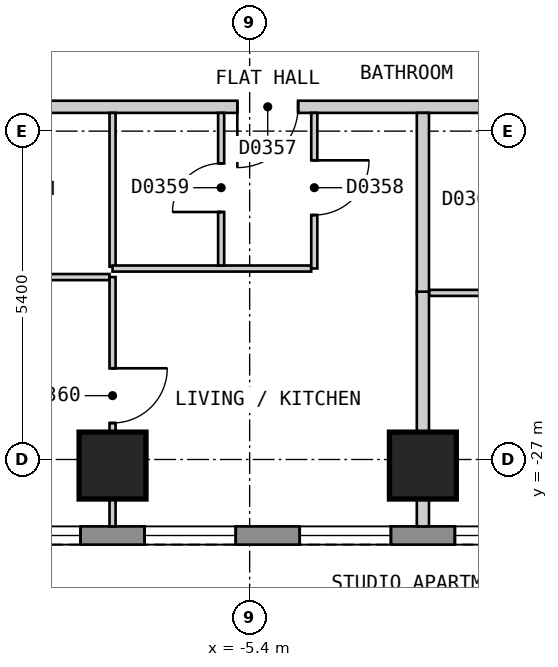
"""IFC4 building model, lengths in metres.
Left out: names, types, materials, properties, quantities, classifications, styles, units other than length and angle.
Written with IfcOpenShell. Run it as: python <this file> out.ifc"""

import sys

from ifc_helpers import new_model, si_unit, direction, frame, frame_2d, origin, origin_2d, place, context, subcontext, project, spatial, polyline, rectangle, outline, extrude, element, fill, save


model = new_model("IFC4")
c1 = context("Model", 3, precision=1e-05, world=origin(), true_north=direction((0.0, 1.0)))
c2 = subcontext(c1, "Body", "Model", "MODEL_VIEW")
j1 = project(units=[si_unit("LENGTHUNIT", "METRE"), si_unit("PLANEANGLEUNIT", "RADIAN")], contexts=[c1])
p1 = place(None, origin())
s1 = spatial("IfcSite", under=j1, at=p1, CompositionType="ELEMENT")
p2 = place(p1, origin())
s2 = spatial("IfcBuilding", under=s1, at=p2, CompositionType="ELEMENT")
p3 = place(p2, frame((0.0, 0.0, 59.4)))
s3 = spatial("IfcBuildingStorey", under=s2, at=p3, CompositionType="ELEMENT", Elevation=59.4)
for number, where, z_axis, x_axis in (
    (1, (-7.655, -27.1, 0.0), (0.0, 0.0, 1.0), (1.0, 0.0, 0.0)),
    (2, (-2.551, -27.1, 0.0), (0.0, 0.0, 1.0), (1.0, 0.0, 0.0)),
):
    element("IfcColumn", number, at=place(p3, frame(where, z_axis=z_axis, x_axis=x_axis)), inside=s3, PredefinedType="COLUMN", context=c2, shape_type="SweptSolid", body=[
        extrude(rectangle(XDim=1.1, YDim=1.1, at=origin_2d()), origin(), (0.0, 0.0, 1.0), 3.0),
    ])
p4 = place(p3, frame((-13.51, -28.25, 0.0), z_axis=(0.0, 0.0, 1.0), x_axis=(1.0, 0.0, 0.0)))
e3 = element("IfcWall", 3, at=p4, inside=s3, PredefinedType="SOLIDWALL", context=c2, shape_type="SweptSolid", body=[
    extrude(outline(polyline([(0.0, -0.15), (27.02, -0.15), (26.94, 0.15), (0.08, 0.15), (0.0, -0.15)])), origin(), (0.0, 0.0, 1.0), 2.6),
])
p5 = place(p4, frame((1.277, 0.0, 0.15)))
e4 = element("IfcOpeningElement", 4, at=p5, cuts=e3, PredefinedType="OPENING", context=c2, shape_type="SweptSolid", body=[
    extrude(rectangle(XDim=1.5, YDim=2.1, at=frame_2d((0.75, 1.05))), frame((0.0, 0.16, 0.0), z_axis=(0.0, -1.0, 0.0), x_axis=(1.0, 0.0, 0.0)), (0.0, 0.0, 1.0), 0.32),
])
p6 = place(p4, frame((3.829, 0.0, 0.15)))
e5 = element("IfcOpeningElement", 5, at=p6, cuts=e3, PredefinedType="OPENING", context=c2, shape_type="SweptSolid", body=[
    extrude(rectangle(XDim=1.5, YDim=2.1, at=frame_2d((0.75, 1.05))), frame((0.0, 0.16, 0.0), z_axis=(0.0, -1.0, 0.0), x_axis=(1.0, 0.0, 0.0)), (0.0, 0.0, 1.0), 0.32),
])
p7 = place(p4, frame((6.381, 0.0, 0.15)))
e6 = element("IfcOpeningElement", 6, at=p7, cuts=e3, PredefinedType="OPENING", context=c2, shape_type="SweptSolid", body=[
    extrude(rectangle(XDim=1.5, YDim=2.1, at=frame_2d((0.75, 1.05))), frame((0.0, 0.16, 0.0), z_axis=(0.0, -1.0, 0.0), x_axis=(1.0, 0.0, 0.0)), (0.0, 0.0, 1.0), 0.32),
])
p8 = place(p4, frame((8.933, 0.0, 0.15)))
e7 = element("IfcOpeningElement", 7, at=p8, cuts=e3, PredefinedType="OPENING", context=c2, shape_type="SweptSolid", body=[
    extrude(rectangle(XDim=1.5, YDim=2.1, at=frame_2d((0.75, 1.05))), frame((0.0, 0.16, 0.0), z_axis=(0.0, -1.0, 0.0), x_axis=(1.0, 0.0, 0.0)), (0.0, 0.0, 1.0), 0.32),
])
p9 = place(p4, frame((11.485, 0.0, 0.15)))
e8 = element("IfcOpeningElement", 8, at=p9, cuts=e3, PredefinedType="OPENING", context=c2, shape_type="SweptSolid", body=[
    extrude(rectangle(XDim=1.5, YDim=2.1, at=frame_2d((0.75, 1.05))), frame((0.0, 0.16, 0.0), z_axis=(0.0, -1.0, 0.0), x_axis=(1.0, 0.0, 0.0)), (0.0, 0.0, 1.0), 0.32),
])
p10 = place(p4, frame((14.037, 0.0, 0.15)))
e9 = element("IfcOpeningElement", 9, at=p10, cuts=e3, PredefinedType="OPENING", context=c2, shape_type="SweptSolid", body=[
    extrude(rectangle(XDim=1.5, YDim=2.1, at=frame_2d((0.75, 1.05))), frame((0.0, 0.16, 0.0), z_axis=(0.0, -1.0, 0.0), x_axis=(1.0, 0.0, 0.0)), (0.0, 0.0, 1.0), 0.32),
])
p11 = place(p4, frame((16.589, 0.0, 0.15)))
e10 = element("IfcOpeningElement", 10, at=p11, cuts=e3, PredefinedType="OPENING", context=c2, shape_type="SweptSolid", body=[
    extrude(rectangle(XDim=1.5, YDim=2.1, at=frame_2d((0.75, 1.05))), frame((0.0, 0.16, 0.0), z_axis=(0.0, -1.0, 0.0), x_axis=(1.0, 0.0, 0.0)), (0.0, 0.0, 1.0), 0.32),
])
p12 = place(p4, frame((19.141, 0.0, 0.15)))
e11 = element("IfcOpeningElement", 11, at=p12, cuts=e3, PredefinedType="OPENING", context=c2, shape_type="SweptSolid", body=[
    extrude(rectangle(XDim=1.5, YDim=2.1, at=frame_2d((0.75, 1.05))), frame((0.0, 0.16, 0.0), z_axis=(0.0, -1.0, 0.0), x_axis=(1.0, 0.0, 0.0)), (0.0, 0.0, 1.0), 0.32),
])
p13 = place(p4, frame((21.693, 0.0, 0.15)))
e12 = element("IfcOpeningElement", 12, at=p13, cuts=e3, PredefinedType="OPENING", context=c2, shape_type="SweptSolid", body=[
    extrude(rectangle(XDim=1.5, YDim=2.1, at=frame_2d((0.75, 1.05))), frame((0.0, 0.16, 0.0), z_axis=(0.0, -1.0, 0.0), x_axis=(1.0, 0.0, 0.0)), (0.0, 0.0, 1.0), 0.32),
])
p14 = place(p4, frame((24.245, 0.0, 0.15)))
e13 = element("IfcOpeningElement", 13, at=p14, cuts=e3, PredefinedType="OPENING", context=c2, shape_type="SweptSolid", body=[
    extrude(rectangle(XDim=1.5, YDim=2.1, at=frame_2d((0.75, 1.05))), frame((0.0, 0.16, 0.0), z_axis=(0.0, -1.0, 0.0), x_axis=(1.0, 0.0, 0.0)), (0.0, 0.0, 1.0), 0.32),
])
p15 = place(p3, frame((-15.4, -21.2, 0.0), z_axis=(0.0, 0.0, 1.0), x_axis=(1.0, 0.0, 0.0)))
e14 = element("IfcWall", 14, at=p15, inside=s3, PredefinedType="PARTITIONING", context=c2, shape_type="SweptSolid", body=[
    extrude(rectangle(XDim=30.799, YDim=0.2, at=frame_2d((15.399, 0.0))), origin(), (0.0, 0.0, 1.0), 2.6),
])
p16 = place(p15, frame((9.797, 0.0, 0.0)))
e15 = element("IfcOpeningElement", 15, at=p16, cuts=e14, PredefinedType="OPENING", context=c2, shape_type="SweptSolid", body=[
    extrude(rectangle(XDim=1.0, YDim=2.1, at=frame_2d((0.5, 1.05))), frame((0.0, 0.11, 0.0), z_axis=(0.0, -1.0, 0.0), x_axis=(1.0, 0.0, 0.0)), (0.0, 0.0, 1.0), 0.22),
])
p17 = place(p15, frame((14.901, 0.0, 0.0)))
e16 = element("IfcOpeningElement", 16, at=p17, cuts=e14, PredefinedType="OPENING", context=c2, shape_type="SweptSolid", body=[
    extrude(rectangle(XDim=1.0, YDim=2.1, at=frame_2d((0.5, 1.05))), frame((0.0, 0.11, 0.0), z_axis=(0.0, -1.0, 0.0), x_axis=(1.0, 0.0, 0.0)), (0.0, 0.0, 1.0), 0.22),
])
p18 = place(p15, frame((24.916, 0.0, 0.0)))
e17 = element("IfcOpeningElement", 17, at=p18, cuts=e14, PredefinedType="OPENING", context=c2, shape_type="SweptSolid", body=[
    extrude(rectangle(XDim=0.9, YDim=2.1, at=frame_2d((0.45, 1.05))), frame((0.0, 0.11, 0.0), z_axis=(0.0, -1.0, 0.0), x_axis=(1.0, 0.0, 0.0)), (0.0, 0.0, 1.0), 0.22),
])
p19 = place(p3, frame((-7.655, -21.3, 0.0), z_axis=(0.0, 0.0, 1.0), x_axis=(0.0, -1.0, 0.0)))
e18 = element("IfcWall", 18, at=p19, inside=s3, PredefinedType="PARTITIONING", context=c2, shape_type="SweptSolid", body=[
    extrude(rectangle(XDim=2.53, YDim=0.1, at=frame_2d((1.265, 0.0))), origin(), (0.0, 0.0, 1.0), 2.6),
])
p20 = place(p3, frame((-7.655, -23.86, 0.0), z_axis=(0.0, 0.0, 1.0), x_axis=(1.0, 0.0, 0.0)))
e19 = element("IfcWall", 19, at=p20, inside=s3, PredefinedType="PARTITIONING", context=c2, shape_type="SweptSolid", body=[
    extrude(rectangle(XDim=3.267, YDim=0.1, at=frame_2d((1.634, 0.0))), origin(), (0.0, 0.0, 1.0), 2.6),
])
p21 = place(p3, frame((-15.848, -24.0, 0.0), z_axis=(0.0, 0.0, 1.0), x_axis=(1.0, 0.0, 0.0)))
e20 = element("IfcWall", 20, at=p21, inside=s3, PredefinedType="PARTITIONING", context=c2, shape_type="SweptSolid", body=[
    extrude(rectangle(XDim=8.143, YDim=0.1, at=frame_2d((4.071, 0.0))), origin(), (0.0, 0.0, 1.0), 2.6),
])
p22 = place(p21, frame((3.596, 0.0, 0.0)))
e21 = element("IfcOpeningElement", 21, at=p22, cuts=e20, PredefinedType="OPENING", context=c2, shape_type="SweptSolid", body=[
    extrude(rectangle(XDim=0.8, YDim=2.1, at=frame_2d((0.4, 1.05))), frame((0.0, 0.06, 0.0), z_axis=(0.0, -1.0, 0.0), x_axis=(1.0, 0.0, 0.0)), (0.0, 0.0, 1.0), 0.12),
])
p23 = place(p3, frame((-2.451, -24.26, 0.0), z_axis=(0.0, 0.0, 1.0), x_axis=(1.0, 0.0, 0.0)))
e22 = element("IfcWall", 22, at=p23, inside=s3, PredefinedType="PARTITIONING", context=c2, shape_type="SweptSolid", body=[
    extrude(rectangle(XDim=3.167, YDim=0.1, at=frame_2d((1.583, 0.0))), origin(), (0.0, 0.0, 1.0), 2.6),
])
p24 = place(p3, frame((-4.337, -23.859, 0.0), z_axis=(0.0, 0.0, 1.0), x_axis=(0.0, 1.0, 0.0)))
e23 = element("IfcWall", 23, at=p24, inside=s3, PredefinedType="PARTITIONING", context=c2, shape_type="SweptSolid", body=[
    extrude(rectangle(XDim=2.559, YDim=0.1, at=frame_2d((1.279, 0.0))), origin(), (0.0, 0.0, 1.0), 2.6),
])
p25 = place(p24, frame((0.879, 0.0, 0.0)))
e24 = element("IfcOpeningElement", 24, at=p25, cuts=e23, PredefinedType="OPENING", context=c2, shape_type="SweptSolid", body=[
    extrude(rectangle(XDim=0.9, YDim=2.1, at=frame_2d((0.45, 1.05))), frame((0.0, 0.06, 0.0), z_axis=(0.0, -1.0, 0.0), x_axis=(1.0, 0.0, 0.0)), (0.0, 0.0, 1.0), 0.12),
])
p26 = place(p3, frame((-5.869, -23.81, 0.0), z_axis=(0.0, 0.0, 1.0), x_axis=(0.0, 1.0, 0.0)))
e25 = element("IfcWall", 25, at=p26, inside=s3, PredefinedType="PARTITIONING", context=c2, shape_type="SweptSolid", body=[
    extrude(rectangle(XDim=2.51, YDim=0.1, at=frame_2d((1.255, 0.0))), origin(), (0.0, 0.0, 1.0), 2.6),
])
p27 = place(p26, frame((0.88, 0.0, 0.0)))
e26 = element("IfcOpeningElement", 26, at=p27, cuts=e25, PredefinedType="OPENING", context=c2, shape_type="SweptSolid", body=[
    extrude(rectangle(XDim=0.8, YDim=2.1, at=frame_2d((0.4, 1.05))), frame((0.0, 0.06, 0.0), z_axis=(0.0, -1.0, 0.0), x_axis=(1.0, 0.0, 0.0)), (0.0, 0.0, 1.0), 0.12),
])
p28 = place(p3, frame((-7.655, -28.1, 0.0), z_axis=(0.0, 0.0, 1.0), x_axis=(0.0, 1.0, 0.0)))
e27 = element("IfcWall", 27, at=p28, inside=s3, PredefinedType="PARTITIONING", context=c2, shape_type="SweptSolid", body=[
    extrude(rectangle(XDim=4.1, YDim=0.1, at=frame_2d((2.05, 0.0))), origin(), (0.0, 0.0, 1.0), 2.6),
])
p29 = place(p28, frame((1.7, 0.0, 0.0)))
e28 = element("IfcOpeningElement", 28, at=p29, cuts=e27, PredefinedType="OPENING", context=c2, shape_type="SweptSolid", body=[
    extrude(rectangle(XDim=0.9, YDim=2.1, at=frame_2d((0.45, 1.05))), frame((0.0, 0.06, 0.0), z_axis=(0.0, -1.0, 0.0), x_axis=(1.0, 0.0, 0.0)), (0.0, 0.0, 1.0), 0.12),
])
p30 = place(p3, frame((-2.551, -21.3, 0.0), z_axis=(0.0, 0.0, 1.0), x_axis=(0.0, -1.0, 0.0)))
e29 = element("IfcWall", 29, at=p30, inside=s3, PredefinedType="PARTITIONING", context=c2, shape_type="SweptSolid", body=[
    extrude(rectangle(XDim=2.98, YDim=0.2, at=frame_2d((1.49, 0.0))), origin(), (0.0, 0.0, 1.0), 2.6),
])
p31 = place(p3, frame((-2.551, -28.1, 0.0), z_axis=(0.0, 0.0, 1.0), x_axis=(0.0, 1.0, 0.0)))
e30 = element("IfcWall", 30, at=p31, inside=s3, PredefinedType="PARTITIONING", context=c2, shape_type="SweptSolid", body=[
    extrude(rectangle(XDim=3.86, YDim=0.2, at=frame_2d((1.93, 0.0))), origin(), (0.0, 0.0, 1.0), 2.6),
])
p32 = place(p6, origin())
e31 = element("IfcWindow", 31, at=p32, inside=s3, PartitioningType="SINGLE_PANEL", PredefinedType="WINDOW", context=c2, shape_type="SweptSolid", body=[
    extrude(rectangle(XDim=1.5, YDim=2.1, at=frame_2d((0.75, 1.05))), frame((0.0, 0.03, 0.0), z_axis=(0.0, -1.0, 0.0), x_axis=(1.0, 0.0, 0.0)), (0.0, 0.0, 1.0), 0.06),
])
fill(e5, e31)
p33 = place(p7, origin())
e32 = element("IfcWindow", 32, at=p33, inside=s3, PartitioningType="SINGLE_PANEL", PredefinedType="WINDOW", context=c2, shape_type="SweptSolid", body=[
    extrude(rectangle(XDim=1.5, YDim=2.1, at=frame_2d((0.75, 1.05))), frame((0.0, 0.03, 0.0), z_axis=(0.0, -1.0, 0.0), x_axis=(1.0, 0.0, 0.0)), (0.0, 0.0, 1.0), 0.06),
])
fill(e6, e32)
p34 = place(p8, origin())
e33 = element("IfcWindow", 33, at=p34, inside=s3, PartitioningType="SINGLE_PANEL", PredefinedType="WINDOW", context=c2, shape_type="SweptSolid", body=[
    extrude(rectangle(XDim=1.5, YDim=2.1, at=frame_2d((0.75, 1.05))), frame((0.0, 0.03, 0.0), z_axis=(0.0, -1.0, 0.0), x_axis=(1.0, 0.0, 0.0)), (0.0, 0.0, 1.0), 0.06),
])
fill(e7, e33)
p35 = place(p9, origin())
e34 = element("IfcWindow", 34, at=p35, inside=s3, PartitioningType="SINGLE_PANEL", PredefinedType="WINDOW", context=c2, shape_type="SweptSolid", body=[
    extrude(rectangle(XDim=1.5, YDim=2.1, at=frame_2d((0.75, 1.05))), frame((0.0, 0.03, 0.0), z_axis=(0.0, -1.0, 0.0), x_axis=(1.0, 0.0, 0.0)), (0.0, 0.0, 1.0), 0.06),
])
fill(e8, e34)
p36 = place(p16, origin())
e35 = element("IfcDoor", 35, at=p36, inside=s3, OperationType="SINGLE_SWING_LEFT", PredefinedType="DOOR", context=c2, shape_type="SweptSolid", body=[
    extrude(rectangle(XDim=1.0, YDim=2.1, at=frame_2d((0.5, 1.05))), frame((0.0, 0.025, 0.0), z_axis=(0.0, -1.0, 0.0), x_axis=(1.0, 0.0, 0.0)), (0.0, 0.0, 1.0), 0.05),
])
fill(e15, e35)
p37 = place(p25, origin())
e36 = element("IfcDoor", 36, at=p37, inside=s3, OperationType="SINGLE_SWING_RIGHT", PredefinedType="DOOR", context=c2, shape_type="SweptSolid", body=[
    extrude(rectangle(XDim=0.9, YDim=2.1, at=frame_2d((0.45, 1.05))), frame((0.0, 0.025, 0.0), z_axis=(0.0, -1.0, 0.0), x_axis=(1.0, 0.0, 0.0)), (0.0, 0.0, 1.0), 0.05),
])
fill(e24, e36)
p38 = place(p27, origin())
e37 = element("IfcDoor", 37, at=p38, inside=s3, OperationType="SINGLE_SWING_LEFT", PredefinedType="DOOR", context=c2, shape_type="SweptSolid", body=[
    extrude(rectangle(XDim=0.8, YDim=2.1, at=frame_2d((0.4, 1.05))), frame((0.0, 0.025, 0.0), z_axis=(0.0, -1.0, 0.0), x_axis=(1.0, 0.0, 0.0)), (0.0, 0.0, 1.0), 0.05),
])
fill(e26, e37)
p39 = place(p29, origin())
e38 = element("IfcDoor", 38, at=p39, inside=s3, OperationType="SINGLE_SWING_RIGHT", PredefinedType="DOOR", context=c2, shape_type="SweptSolid", body=[
    extrude(rectangle(XDim=0.9, YDim=2.1, at=frame_2d((0.45, 1.05))), frame((0.0, 0.025, 0.0), z_axis=(0.0, -1.0, 0.0), x_axis=(1.0, 0.0, 0.0)), (0.0, 0.0, 1.0), 0.05),
])
fill(e28, e38)
save(model, sys.argv[1])
